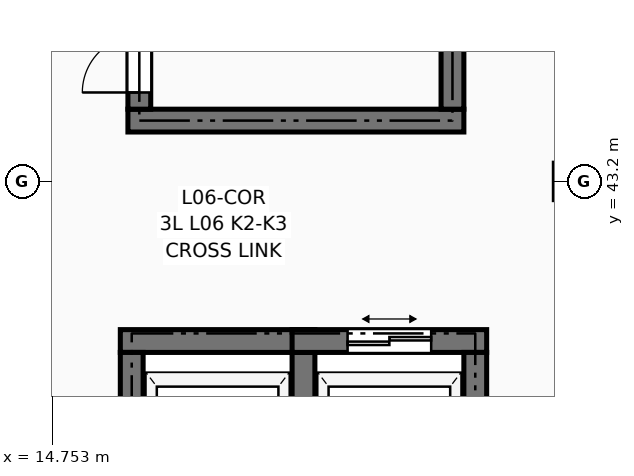
"""IFC4 building model, lengths in metres.
Left out: names, types, materials, properties, quantities, classifications, styles, units other than length and angle.
Written with IfcOpenShell. Run it as: python <this file> out.ifc"""

import sys

from ifc_helpers import new_model, si_unit, direction, frame, frame_2d, origin, place, context, subcontext, project, spatial, rectangle, extrude, element, fill, save


model = new_model("IFC4")
c1 = context("Model", 3, precision=1e-05, world=origin(), true_north=direction((0.0, 1.0)))
c2 = subcontext(c1, "Body", "Model", "MODEL_VIEW")
j1 = project(units=[si_unit("LENGTHUNIT", "METRE"), si_unit("PLANEANGLEUNIT", "RADIAN")], contexts=[c1])
p1 = place(None, origin())
s1 = spatial("IfcSite", under=j1, at=p1, CompositionType="ELEMENT")
p2 = place(p1, origin())
s2 = spatial("IfcBuilding", under=s1, at=p2, CompositionType="ELEMENT")
p3 = place(p2, frame((0.0, 0.0, 22.95)))
s3 = spatial("IfcBuildingStorey", under=s2, at=p3, CompositionType="ELEMENT", Elevation=22.95)
p4 = place(p3, frame((15.75, 44.0, 0.0), z_axis=(0.0, 0.0, 1.0), x_axis=(1.0, 0.0, 0.0)))
e1 = element("IfcWall", 1, at=p4, inside=s3, PredefinedType="SHEAR", context=c2, shape_type="SweptSolid", body=[
    extrude(rectangle(XDim=4.42, YDim=0.3, at=frame_2d((2.21, 0.0))), origin(), (0.0, 0.0, 1.0), 3.09),
])
p5 = place(p3, frame((15.9, 44.15, 0.0), z_axis=(0.0, 0.0, 1.0), x_axis=(0.0, 1.0, 0.0)))
e2 = element("IfcWall", 2, at=p5, inside=s3, PredefinedType="SHEAR", context=c2, shape_type="SweptSolid", body=[
    extrude(rectangle(XDim=7.3, YDim=0.3, at=frame_2d((3.65, 0.0))), origin(), (0.0, 0.0, 1.0), 3.09),
])
p6 = place(p5, frame((0.22, 0.0, 0.0)))
e3 = element("IfcOpeningElement", 3, at=p6, cuts=e2, PredefinedType="OPENING", context=c2, shape_type="SweptSolid", body=[
    extrude(rectangle(XDim=1.5, YDim=2.2, at=frame_2d((0.75, 1.1))), frame((0.0, 0.162, 0.0), z_axis=(0.0, -1.0, 0.0), x_axis=(1.0, 0.0, 0.0)), (0.0, 0.0, 1.0), 0.324),
])
p7 = place(p3, frame((20.02, 44.15, 0.0), z_axis=(0.0, 0.0, 1.0), x_axis=(0.0, 1.0, 0.0)))
e4 = element("IfcWall", 4, at=p7, inside=s3, PredefinedType="SHEAR", context=c2, shape_type="SweptSolid", body=[
    extrude(rectangle(XDim=7.3, YDim=0.3, at=frame_2d((3.65, 0.0))), origin(), (0.0, 0.0, 1.0), 3.09),
])
p8 = place(p3, frame((15.65, 41.1, 0.0), z_axis=(0.0, 0.0, 1.0), x_axis=(1.0, 0.0, 0.0)))
e5 = element("IfcWall", 5, at=p8, inside=s3, PredefinedType="SHEAR", context=c2, shape_type="SweptSolid", body=[
    extrude(rectangle(XDim=2.56, YDim=0.3, at=frame_2d((1.28, 0.0))), origin(), (0.0, 0.0, 1.0), 3.09),
])
p9 = place(p3, frame((15.8, 37.98, 0.0), z_axis=(0.0, 0.0, 1.0), x_axis=(0.0, 1.0, 0.0)))
e6 = element("IfcWall", 6, at=p9, inside=s3, PredefinedType="SHEAR", context=c2, shape_type="SweptSolid", body=[
    extrude(rectangle(XDim=2.97, YDim=0.3, at=frame_2d((1.485, 0.0))), origin(), (0.0, 0.0, 1.0), 3.09),
])
p10 = place(p9, frame((0.935, 0.0, 0.0)))
e7 = element("IfcOpeningElement", 7, at=p10, cuts=e6, PredefinedType="OPENING", context=c2, shape_type="SweptSolid", body=[
    extrude(rectangle(XDim=1.1, YDim=2.2, at=frame_2d((0.55, 1.1))), frame((0.0, 0.162, 0.0), z_axis=(0.0, -1.0, 0.0), x_axis=(1.0, 0.0, 0.0)), (0.0, 0.0, 1.0), 0.324),
])
p11 = place(p3, frame((18.06, 37.98, 0.0), z_axis=(0.0, 0.0, 1.0), x_axis=(0.0, 1.0, 0.0)))
e8 = element("IfcWall", 8, at=p11, inside=s3, PredefinedType="SHEAR", context=c2, shape_type="SweptSolid", body=[
    extrude(rectangle(XDim=2.97, YDim=0.3, at=frame_2d((1.485, 0.0))), origin(), (0.0, 0.0, 1.0), 3.09),
])
p12 = place(p3, frame((17.91, 41.1, 0.0), z_axis=(0.0, 0.0, 1.0), x_axis=(1.0, 0.0, 0.0)))
e9 = element("IfcWall", 9, at=p12, inside=s3, PredefinedType="SHEAR", context=c2, shape_type="SweptSolid", body=[
    extrude(rectangle(XDim=2.56, YDim=0.3, at=frame_2d((1.28, 0.0))), origin(), (0.0, 0.0, 1.0), 3.09),
])
p13 = place(p12, frame((0.73, 0.0, 0.0)))
e10 = element("IfcOpeningElement", 10, at=p13, cuts=e9, PredefinedType="OPENING", context=c2, shape_type="SweptSolid", body=[
    extrude(rectangle(XDim=1.1, YDim=2.2, at=frame_2d((0.55, 1.1))), frame((0.0, 0.162, 0.0), z_axis=(0.0, -1.0, 0.0), x_axis=(1.0, 0.0, 0.0)), (0.0, 0.0, 1.0), 0.324),
])
p14 = place(p3, frame((20.32, 37.98, 0.0), z_axis=(0.0, 0.0, 1.0), x_axis=(0.0, 1.0, 0.0)))
e11 = element("IfcWall", 11, at=p14, inside=s3, PredefinedType="SHEAR", context=c2, shape_type="SweptSolid", body=[
    extrude(rectangle(XDim=2.97, YDim=0.3, at=frame_2d((1.485, 0.0))), origin(), (0.0, 0.0, 1.0), 3.09),
])
p15 = place(p6, origin())
e12 = element("IfcDoor", 12, at=p15, inside=s3, OperationType="DOUBLE_DOOR_SINGLE_SWING", PredefinedType="DOOR", context=c2, shape_type="SweptSolid", body=[
    extrude(rectangle(XDim=1.5, YDim=2.2, at=frame_2d((0.75, 1.1))), frame((0.0, 0.025, 0.0), z_axis=(0.0, -1.0, 0.0), x_axis=(1.0, 0.0, 0.0)), (0.0, 0.0, 1.0), 0.05),
])
fill(e3, e12)
p16 = place(p13, origin())
e13 = element("IfcDoor", 13, at=p16, inside=s3, OperationType="DOUBLE_DOOR_SLIDING", PredefinedType="DOOR", context=c2, shape_type="SweptSolid", body=[
    extrude(rectangle(XDim=1.1, YDim=2.2, at=frame_2d((0.55, 1.1))), frame((0.0, 0.025, 0.0), z_axis=(0.0, -1.0, 0.0), x_axis=(1.0, 0.0, 0.0)), (0.0, 0.0, 1.0), 0.05),
])
fill(e10, e13)
save(model, sys.argv[1])
